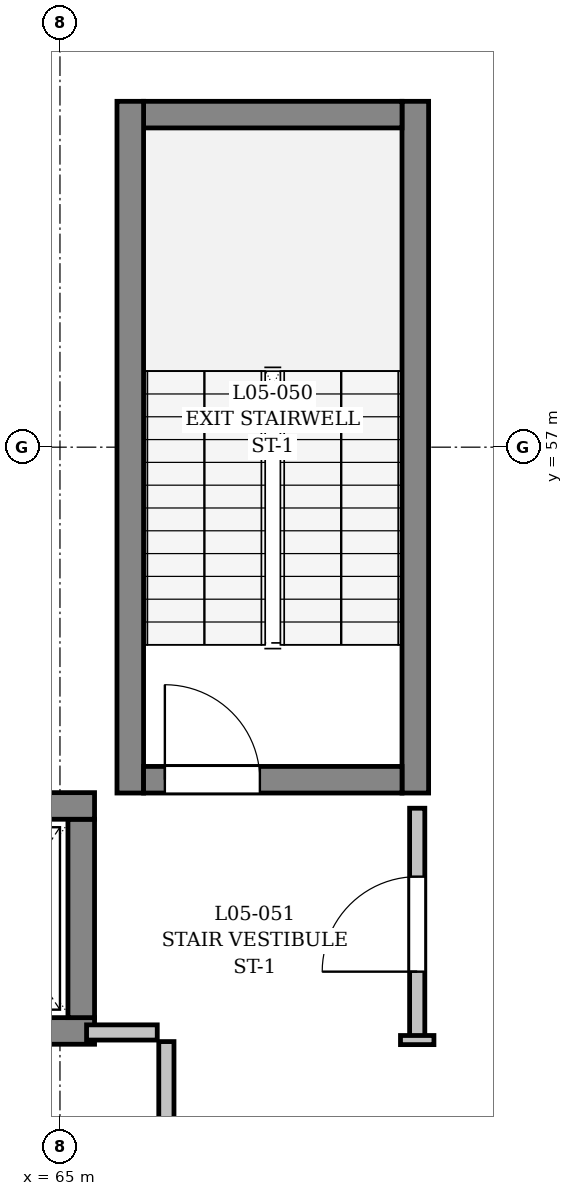
"""IFC4 building model, lengths in metres.
Left out: names, types, materials, properties, quantities, classifications, styles, units other than length and angle.
Written with IfcOpenShell. Run it as: python <this file> out.ifc"""

import sys

from ifc_helpers import new_model, si_unit, direction, frame, frame_2d, origin, place, context, subcontext, project, spatial, rectangle, extrude, element, fill, save


model = new_model("IFC4")
c1 = context("Model", 3, precision=1e-05, world=origin(), true_north=direction((0.0, 1.0)))
c2 = subcontext(c1, "Body", "Model", "MODEL_VIEW")
j1 = project(units=[si_unit("LENGTHUNIT", "METRE"), si_unit("PLANEANGLEUNIT", "RADIAN")], contexts=[c1])
p1 = place(None, origin())
s1 = spatial("IfcSite", under=j1, at=p1, CompositionType="ELEMENT")
p2 = place(p1, origin())
s2 = spatial("IfcBuilding", under=s1, at=p2, CompositionType="ELEMENT")
p3 = place(p2, frame((0.0, 0.0, 19.8)))
s3 = spatial("IfcBuildingStorey", under=s2, at=p3, CompositionType="ELEMENT", Elevation=19.8)
p4 = place(p3, frame((69.675, 52.45, 0.0), z_axis=(0.0, 0.0, 1.0), x_axis=(0.0, 1.0, 0.0)))
e1 = element("IfcWall", 1, at=p4, inside=s3, PredefinedType="SHEAR", context=c2, shape_type="SweptSolid", body=[
    extrude(rectangle(XDim=9.1, YDim=0.35, at=frame_2d((4.55, 0.0))), origin(), (0.0, 0.0, 1.0), 4.5),
])
p5 = place(p3, frame((69.5, 61.375, 0.0), z_axis=(0.0, 0.0, 1.0), x_axis=(-1.0, 0.0, 0.0)))
e2 = element("IfcWall", 2, at=p5, inside=s3, PredefinedType="SHEAR", context=c2, shape_type="SweptSolid", body=[
    extrude(rectangle(XDim=3.4, YDim=0.35, at=frame_2d((1.7, 0.0))), origin(), (0.0, 0.0, 1.0), 4.5),
])
p6 = place(p3, frame((65.925, 61.55, 0.0), z_axis=(0.0, 0.0, 1.0), x_axis=(0.0, -1.0, 0.0)))
e3 = element("IfcWall", 3, at=p6, inside=s3, PredefinedType="SHEAR", context=c2, shape_type="SweptSolid", body=[
    extrude(rectangle(XDim=9.1, YDim=0.35, at=frame_2d((4.55, 0.0))), origin(), (0.0, 0.0, 1.0), 4.5),
])
p7 = place(p3, frame((66.1, 52.625, 0.0), z_axis=(0.0, 0.0, 1.0), x_axis=(1.0, 0.0, 0.0)))
e4 = element("IfcWall", 4, at=p7, inside=s3, PredefinedType="SHEAR", context=c2, shape_type="SweptSolid", body=[
    extrude(rectangle(XDim=3.4, YDim=0.35, at=frame_2d((1.7, 0.0))), origin(), (0.0, 0.0, 1.0), 4.5),
])
p8 = place(p7, frame((0.28, 0.0, 0.0)))
e5 = element("IfcOpeningElement", 5, at=p8, cuts=e4, PredefinedType="OPENING", context=c2, shape_type="SweptSolid", body=[
    extrude(rectangle(XDim=1.25, YDim=2.2, at=frame_2d((0.625, 1.1))), frame((0.0, 0.185, 0.0), z_axis=(0.0, -1.0, 0.0), x_axis=(1.0, 0.0, 0.0)), (0.0, 0.0, 1.0), 0.37),
])
p9 = place(p3, frame((62.945, 49.32, 0.0), z_axis=(0.0, 0.0, 1.0), x_axis=(1.0, 0.0, 0.0)))
e6 = element("IfcWall", 6, at=p9, inside=s3, PredefinedType="SHEAR", context=c2, shape_type="SweptSolid", body=[
    extrude(rectangle(XDim=2.51, YDim=0.35, at=frame_2d((1.255, 0.0))), origin(), (0.0, 0.0, 1.0), 4.5),
])
p10 = place(p9, frame((0.705, 0.0, 0.0)))
e7 = element("IfcOpeningElement", 7, at=p10, cuts=e6, PredefinedType="OPENING", context=c2, shape_type="SweptSolid", body=[
    extrude(rectangle(XDim=1.1, YDim=2.2, at=frame_2d((0.55, 1.1))), frame((0.0, 0.185, 0.0), z_axis=(0.0, -1.0, 0.0), x_axis=(1.0, 0.0, 0.0)), (0.0, 0.0, 1.0), 0.37),
])
p11 = place(p3, frame((65.28, 49.495, 0.0), z_axis=(0.0, 0.0, 1.0), x_axis=(0.0, 1.0, 0.0)))
e8 = element("IfcWall", 8, at=p11, inside=s3, PredefinedType="SHEAR", context=c2, shape_type="SweptSolid", body=[
    extrude(rectangle(XDim=2.61, YDim=0.35, at=frame_2d((1.305, 0.0))), origin(), (0.0, 0.0, 1.0), 4.5),
])
p12 = place(p3, frame((65.455, 52.28, 0.0), z_axis=(0.0, 0.0, 1.0), x_axis=(-1.0, 0.0, 0.0)))
e9 = element("IfcWall", 9, at=p12, inside=s3, PredefinedType="SHEAR", context=c2, shape_type="SweptSolid", body=[
    extrude(rectangle(XDim=2.51, YDim=0.35, at=frame_2d((1.255, 0.0))), origin(), (0.0, 0.0, 1.0), 4.5),
])
p13 = place(p3, frame((66.4, 46.32, 0.0), z_axis=(0.0, 0.0, 1.0), x_axis=(0.0, 1.0, 0.0)))
e10 = element("IfcWall", 10, at=p13, inside=s3, PredefinedType="PARTITIONING", context=c2, shape_type="SweptSolid", body=[
    extrude(rectangle(XDim=2.86, YDim=0.2, at=frame_2d((1.43, 0.0))), origin(), (0.0, 0.0, 1.0), 4.5),
])
p14 = place(p3, frame((65.35, 49.3, 0.0), z_axis=(0.0, 0.0, 1.0), x_axis=(1.0, 0.0, 0.0)))
e11 = element("IfcWall", 11, at=p14, inside=s3, PredefinedType="PARTITIONING", context=c2, shape_type="SweptSolid", body=[
    extrude(rectangle(XDim=0.93, YDim=0.2, at=frame_2d((0.465, 0.0))), origin(), (0.0, 0.0, 1.0), 4.5),
])
p15 = place(p3, frame((69.7, 49.2, 0.0), z_axis=(0.0, 0.0, 1.0), x_axis=(0.0, 1.0, 0.0)))
e12 = element("IfcWall", 12, at=p15, inside=s3, PredefinedType="PARTITIONING", context=c2, shape_type="SweptSolid", body=[
    extrude(rectangle(XDim=3.05, YDim=0.2, at=frame_2d((1.525, 0.0))), origin(), (0.0, 0.0, 1.0), 4.5),
])
p16 = place(p15, frame((0.9, 0.0, 0.0)))
e13 = element("IfcOpeningElement", 13, at=p16, cuts=e12, PredefinedType="OPENING", context=c2, shape_type="SweptSolid", body=[
    extrude(rectangle(XDim=1.25, YDim=2.2, at=frame_2d((0.625, 1.1))), frame((0.0, 0.11, 0.0), z_axis=(0.0, -1.0, 0.0), x_axis=(1.0, 0.0, 0.0)), (0.0, 0.0, 1.0), 0.22),
])
p17 = place(p3, frame((69.92, 49.2, 0.0), z_axis=(0.0, 0.0, 1.0), x_axis=(-1.0, 0.0, 0.0)))
e14 = element("IfcWall", 14, at=p17, inside=s3, PredefinedType="PARTITIONING", context=c2, shape_type="SweptSolid", body=[
    extrude(rectangle(XDim=0.44, YDim=0.12, at=frame_2d((0.22, 0.0))), origin(), (0.0, 0.0, 1.0), 4.5),
])
p18 = place(p8, origin())
e15 = element("IfcDoor", 15, at=p18, inside=s3, OperationType="SINGLE_SWING_RIGHT", PredefinedType="DOOR", context=c2, shape_type="SweptSolid", body=[
    extrude(rectangle(XDim=1.25, YDim=2.2, at=frame_2d((0.625, 1.1))), frame((0.0, 0.025, 0.0), z_axis=(0.0, -1.0, 0.0), x_axis=(1.0, 0.0, 0.0)), (0.0, 0.0, 1.0), 0.05),
])
fill(e5, e15)
p19 = place(p16, origin())
e16 = element("IfcDoor", 16, at=p19, inside=s3, OperationType="SINGLE_SWING_LEFT", PredefinedType="DOOR", context=c2, shape_type="SweptSolid", body=[
    extrude(rectangle(XDim=1.25, YDim=2.2, at=frame_2d((0.625, 1.1))), frame((0.0, 0.025, 0.0), z_axis=(0.0, -1.0, 0.0), x_axis=(1.0, 0.0, 0.0)), (0.0, 0.0, 1.0), 0.05),
])
fill(e13, e16)
save(model, sys.argv[1])
